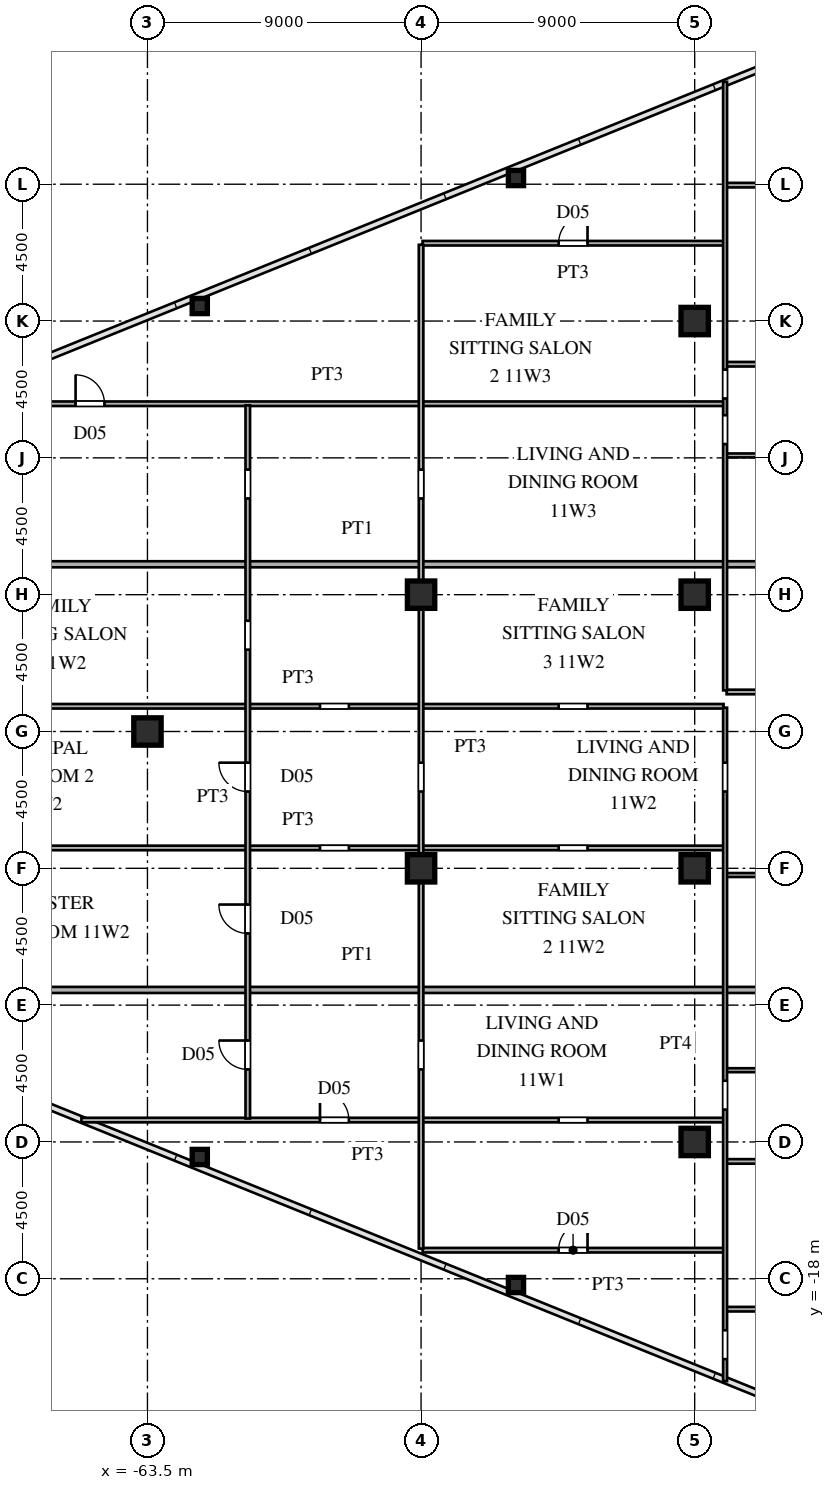
"""IFC4 building model, lengths in metres.
Left out: names, types, materials, properties, quantities, classifications, styles, units other than length and angle.
Written with IfcOpenShell. Run it as: python <this file> out.ifc"""

import sys

from ifc_helpers import new_model, si_unit, direction, frame, frame_2d, origin, origin_2d, place, context, subcontext, project, spatial, rectangle, hollow_rectangle, i_section, extrude, source, transform, mapped, element, fill, save


model = new_model("IFC4")
c1 = context("Model", 3, precision=1e-05, world=origin(), true_north=direction((0.0, 1.0)))
c2 = subcontext(c1, "Body", "Model", "MODEL_VIEW")
j1 = project(units=[si_unit("LENGTHUNIT", "METRE"), si_unit("PLANEANGLEUNIT", "RADIAN")], contexts=[c1])
p1 = place(None, origin())
s1 = spatial("IfcSite", under=j1, at=p1, CompositionType="ELEMENT")
p2 = place(p1, origin())
s2 = spatial("IfcBuilding", under=s1, at=p2, CompositionType="ELEMENT")
p3 = place(p2, frame((0.0, 0.0, 44.1)))
s3 = spatial("IfcBuildingStorey", under=s2, at=p3, CompositionType="ELEMENT", Elevation=44.1)
m1 = source(origin(), c2, "Body", "SweptSolid", [
    extrude(i_section(OverallWidth=0.9, OverallDepth=0.9, WebThickness=0.036, FlangeThickness=0.055, at=origin_2d()), origin(), (0.0, 0.0, 1.0), 3.6),
])
for number, where, z_axis, x_axis in (
    (1, (-45.5, -13.5, 0.0), (0.0, 0.0, 1.0), (1.0, 0.0, 0.0)),
    (2, (-45.5, -4.5, 0.0), (0.0, 0.0, 1.0), (1.0, 0.0, 0.0)),
    (3, (-45.5, 4.5, 0.0), (0.0, 0.0, 1.0), (1.0, 0.0, 0.0)),
    (4, (-45.5, 13.5, 0.0), (0.0, 0.0, 1.0), (1.0, 0.0, 0.0)),
    (5, (-54.5, -4.5, 0.0), (0.0, 0.0, 1.0), (1.0, 0.0, 0.0)),
    (6, (-54.5, 4.5, 0.0), (0.0, 0.0, 1.0), (1.0, 0.0, 0.0)),
    (7, (-63.5, 0.0, 0.0), (0.0, 0.0, 1.0), (1.0, 0.0, 0.0)),
):
    element("IfcColumn", number, at=place(p3, frame(where, z_axis=z_axis, x_axis=x_axis)), inside=s3, PredefinedType="COLUMN", context=c2, shape_type="MappedRepresentation", body=[
        mapped(m1, transform((0.0, 0.0, 0.0), scale=1.0)),
    ])
m2 = source(origin(), c2, "Body", "SweptSolid", [
    extrude(hollow_rectangle(XDim=0.5, YDim=0.5, WallThickness=0.02, at=origin_2d()), origin(), (0.0, 0.0, 1.0), 3.6),
])
for number, where, z_axis, x_axis in (
    (8, (-51.378, -18.204, 0.0), (0.0, 0.0, 1.0), (1.0, 0.0, 0.0)),
    (9, (-61.779, -13.994, 0.0), (0.0, 0.0, 1.0), (1.0, 0.0, 0.0)),
    (10, (-51.378, 18.204, 0.0), (0.0, 0.0, 1.0), (1.0, 0.0, 0.0)),
    (11, (-61.779, 13.994, 0.0), (0.0, 0.0, 1.0), (1.0, 0.0, 0.0)),
):
    element("IfcColumn", number, at=place(p3, frame(where, z_axis=z_axis, x_axis=x_axis)), inside=s3, PredefinedType="COLUMN", context=c2, shape_type="MappedRepresentation", body=[
        mapped(m2, transform((0.0, 0.0, 0.0), scale=1.0)),
    ])
p4 = place(p3, frame((-44.45, -19.0, 0.0), z_axis=(0.0, 0.0, 1.0), x_axis=(1.0, 0.0, 0.0)))
e12 = element("IfcWall", 12, at=p4, inside=s3, PredefinedType="PARTITIONING", context=c2, shape_type="SweptSolid", body=[
    extrude(rectangle(XDim=6.15, YDim=0.15, at=frame_2d((3.075, 0.0))), origin(), (0.0, 0.0, 1.0), 3.38),
])
p5 = place(p3, frame((-54.45, -17.06, 0.0), z_axis=(0.0, 0.0, 1.0), x_axis=(1.0, 0.0, 0.0)))
e13 = element("IfcWall", 13, at=p5, inside=s3, PredefinedType="PARTITIONING", context=c2, shape_type="SweptSolid", body=[
    extrude(rectangle(XDim=9.9, YDim=0.15, at=frame_2d((4.95, 0.0))), origin(), (0.0, 0.0, 1.0), 3.38),
])
p6 = place(p5, frame((4.475, 0.0, 0.0)))
e14 = element("IfcOpeningElement", 14, at=p6, cuts=e13, PredefinedType="OPENING", context=c2, shape_type="SweptSolid", body=[
    extrude(rectangle(XDim=0.95, YDim=2.15, at=frame_2d((0.475, 1.075))), frame((0.0, 0.085, 0.0), z_axis=(0.0, -1.0, 0.0), x_axis=(1.0, 0.0, 0.0)), (0.0, 0.0, 1.0), 0.17),
])
p7 = place(p3, frame((-44.45, -14.14, 0.0), z_axis=(0.0, 0.0, 1.0), x_axis=(1.0, 0.0, 0.0)))
e15 = element("IfcWall", 15, at=p7, inside=s3, PredefinedType="PARTITIONING", context=c2, shape_type="SweptSolid", body=[
    extrude(rectangle(XDim=6.1, YDim=0.15, at=frame_2d((3.05, 0.0))), origin(), (0.0, 0.0, 1.0), 3.38),
])
p8 = place(p7, frame((2.575, 0.0, 0.0)))
e16 = element("IfcOpeningElement", 16, at=p8, cuts=e15, PredefinedType="OPENING", context=c2, shape_type="SweptSolid", body=[
    extrude(rectangle(XDim=0.95, YDim=2.15, at=frame_2d((0.475, 1.075))), frame((0.0, 0.085, 0.0), z_axis=(0.0, -1.0, 0.0), x_axis=(1.0, 0.0, 0.0)), (0.0, 0.0, 1.0), 0.17),
])
p9 = place(p3, frame((-65.672, -12.78, 0.0), z_axis=(0.0, 0.0, 1.0), x_axis=(1.0, 0.0, 0.0)))
e17 = element("IfcWall", 17, at=p9, inside=s3, PredefinedType="PARTITIONING", context=c2, shape_type="SweptSolid", body=[
    extrude(rectangle(XDim=21.122, YDim=0.15, at=frame_2d((10.561, 0.0))), origin(), (0.0, 0.0, 1.0), 3.38),
])
p10 = place(p9, frame((15.697, 0.0, 0.0)))
e18 = element("IfcOpeningElement", 18, at=p10, cuts=e17, PredefinedType="OPENING", context=c2, shape_type="SweptSolid", body=[
    extrude(rectangle(XDim=0.95, YDim=2.15, at=frame_2d((0.475, 1.075))), frame((0.0, 0.085, 0.0), z_axis=(0.0, -1.0, 0.0), x_axis=(1.0, 0.0, 0.0)), (0.0, 0.0, 1.0), 0.17),
])
p11 = place(p9, frame((7.847, 0.0, 0.0)))
e19 = element("IfcOpeningElement", 19, at=p11, cuts=e17, PredefinedType="OPENING", context=c2, shape_type="SweptSolid", body=[
    extrude(rectangle(XDim=0.95, YDim=2.15, at=frame_2d((0.475, 1.075))), frame((0.0, 0.085, 0.0), z_axis=(0.0, -1.0, 0.0), x_axis=(1.0, 0.0, 0.0)), (0.0, 0.0, 1.0), 0.17),
])
p12 = place(p3, frame((-44.45, -11.14, 0.0), z_axis=(0.0, 0.0, 1.0), x_axis=(1.0, 0.0, 0.0)))
e20 = element("IfcWall", 20, at=p12, inside=s3, PredefinedType="PARTITIONING", context=c2, shape_type="SweptSolid", body=[
    extrude(rectangle(XDim=6.1, YDim=0.13, at=frame_2d((3.05, 0.0))), origin(), (0.0, 0.0, 1.0), 3.38),
])
p13 = place(p12, frame((2.61, 0.0, 0.0)))
e21 = element("IfcOpeningElement", 21, at=p13, cuts=e20, PredefinedType="OPENING", context=c2, shape_type="SweptSolid", body=[
    extrude(rectangle(XDim=0.88, YDim=2.1, at=frame_2d((0.44, 1.05))), frame((0.0, 0.075, 0.0), z_axis=(0.0, -1.0, 0.0), x_axis=(1.0, 0.0, 0.0)), (0.0, 0.0, 1.0), 0.15),
])
p14 = place(p3, frame((-72.505, -8.5, 0.0), z_axis=(0.0, 0.0, 1.0), x_axis=(1.0, 0.0, 0.0)))
e22 = element("IfcWall", 22, at=p14, inside=s3, PredefinedType="PARTITIONING", context=c2, shape_type="SweptSolid", body=[
    extrude(rectangle(XDim=34.125, YDim=0.2, at=frame_2d((17.062, 0.0))), origin(), (0.0, 0.0, 1.0), 3.38),
])
p15 = place(p3, frame((-44.45, -4.72, 0.0), z_axis=(0.0, 0.0, 1.0), x_axis=(1.0, 0.0, 0.0)))
e23 = element("IfcWall", 23, at=p15, inside=s3, PredefinedType="PARTITIONING", context=c2, shape_type="SweptSolid", body=[
    extrude(rectangle(XDim=6.1, YDim=0.13, at=frame_2d((3.05, 0.0))), origin(), (0.0, 0.0, 1.0), 3.38),
])
p16 = place(p15, frame((2.61, 0.0, 0.0)))
e24 = element("IfcOpeningElement", 24, at=p16, cuts=e23, PredefinedType="OPENING", context=c2, shape_type="SweptSolid", body=[
    extrude(rectangle(XDim=0.88, YDim=2.1, at=frame_2d((0.44, 1.05))), frame((0.0, 0.075, 0.0), z_axis=(0.0, -1.0, 0.0), x_axis=(1.0, 0.0, 0.0)), (0.0, 0.0, 1.0), 0.15),
])
p17 = place(p3, frame((-72.535, -3.83, 0.0), z_axis=(0.0, 0.0, 1.0), x_axis=(1.0, 0.0, 0.0)))
e25 = element("IfcWall", 25, at=p17, inside=s3, PredefinedType="PARTITIONING", context=c2, shape_type="SweptSolid", body=[
    extrude(rectangle(XDim=27.985, YDim=0.15, at=frame_2d((13.992, 0.0))), origin(), (0.0, 0.0, 1.0), 3.38),
])
p18 = place(p17, frame((22.56, 0.0, 0.0)))
e26 = element("IfcOpeningElement", 26, at=p18, cuts=e25, PredefinedType="OPENING", context=c2, shape_type="SweptSolid", body=[
    extrude(rectangle(XDim=0.95, YDim=2.15, at=frame_2d((0.475, 1.075))), frame((0.0, 0.085, 0.0), z_axis=(0.0, -1.0, 0.0), x_axis=(1.0, 0.0, 0.0)), (0.0, 0.0, 1.0), 0.17),
])
p19 = place(p17, frame((14.71, 0.0, 0.0)))
e27 = element("IfcOpeningElement", 27, at=p19, cuts=e25, PredefinedType="OPENING", context=c2, shape_type="SweptSolid", body=[
    extrude(rectangle(XDim=0.95, YDim=2.15, at=frame_2d((0.475, 1.075))), frame((0.0, 0.085, 0.0), z_axis=(0.0, -1.0, 0.0), x_axis=(1.0, 0.0, 0.0)), (0.0, 0.0, 1.0), 0.17),
])
p20 = place(p3, frame((-72.535, 0.83, 0.0), z_axis=(0.0, 0.0, 1.0), x_axis=(1.0, 0.0, 0.0)))
e28 = element("IfcWall", 28, at=p20, inside=s3, PredefinedType="PARTITIONING", context=c2, shape_type="SweptSolid", body=[
    extrude(rectangle(XDim=27.985, YDim=0.15, at=frame_2d((13.992, 0.0))), origin(), (0.0, 0.0, 1.0), 3.38),
])
p21 = place(p20, frame((22.56, 0.0, 0.0)))
e29 = element("IfcOpeningElement", 29, at=p21, cuts=e28, PredefinedType="OPENING", context=c2, shape_type="SweptSolid", body=[
    extrude(rectangle(XDim=0.95, YDim=2.15, at=frame_2d((0.475, 1.075))), frame((0.0, 0.085, 0.0), z_axis=(0.0, -1.0, 0.0), x_axis=(1.0, 0.0, 0.0)), (0.0, 0.0, 1.0), 0.17),
])
p22 = place(p20, frame((14.71, 0.0, 0.0)))
e30 = element("IfcOpeningElement", 30, at=p22, cuts=e28, PredefinedType="OPENING", context=c2, shape_type="SweptSolid", body=[
    extrude(rectangle(XDim=0.95, YDim=2.15, at=frame_2d((0.475, 1.075))), frame((0.0, 0.085, 0.0), z_axis=(0.0, -1.0, 0.0), x_axis=(1.0, 0.0, 0.0)), (0.0, 0.0, 1.0), 0.17),
])
p23 = place(p3, frame((-44.45, 1.3, 0.0), z_axis=(0.0, 0.0, 1.0), x_axis=(1.0, 0.0, 0.0)))
e31 = element("IfcWall", 31, at=p23, inside=s3, PredefinedType="PARTITIONING", context=c2, shape_type="SweptSolid", body=[
    extrude(rectangle(XDim=6.1, YDim=0.15, at=frame_2d((3.05, 0.0))), origin(), (0.0, 0.0, 1.0), 3.38),
])
p24 = place(p23, frame((2.575, 0.0, 0.0)))
e32 = element("IfcOpeningElement", 32, at=p24, cuts=e31, PredefinedType="OPENING", context=c2, shape_type="SweptSolid", body=[
    extrude(rectangle(XDim=0.95, YDim=2.15, at=frame_2d((0.475, 1.075))), frame((0.0, 0.085, 0.0), z_axis=(0.0, -1.0, 0.0), x_axis=(1.0, 0.0, 0.0)), (0.0, 0.0, 1.0), 0.17),
])
p25 = place(p3, frame((-72.505, 5.5, 0.0), z_axis=(0.0, 0.0, 1.0), x_axis=(1.0, 0.0, 0.0)))
e33 = element("IfcWall", 33, at=p25, inside=s3, PredefinedType="PARTITIONING", context=c2, shape_type="SweptSolid", body=[
    extrude(rectangle(XDim=34.125, YDim=0.2, at=frame_2d((17.062, 0.0))), origin(), (0.0, 0.0, 1.0), 3.38),
])
p26 = place(p3, frame((-44.45, 9.08, 0.0), z_axis=(0.0, 0.0, 1.0), x_axis=(1.0, 0.0, 0.0)))
e34 = element("IfcWall", 34, at=p26, inside=s3, PredefinedType="PARTITIONING", context=c2, shape_type="SweptSolid", body=[
    extrude(rectangle(XDim=6.1, YDim=0.13, at=frame_2d((3.05, 0.0))), origin(), (0.0, 0.0, 1.0), 3.38),
])
p27 = place(p26, frame((2.61, 0.0, 0.0)))
e35 = element("IfcOpeningElement", 35, at=p27, cuts=e34, PredefinedType="OPENING", context=c2, shape_type="SweptSolid", body=[
    extrude(rectangle(XDim=0.88, YDim=2.1, at=frame_2d((0.44, 1.05))), frame((0.0, 0.075, 0.0), z_axis=(0.0, -1.0, 0.0), x_axis=(1.0, 0.0, 0.0)), (0.0, 0.0, 1.0), 0.15),
])
p28 = place(p3, frame((-70.613, 10.78, 0.0), z_axis=(0.0, 0.0, 1.0), x_axis=(1.0, 0.0, 0.0)))
e36 = element("IfcWall", 36, at=p28, inside=s3, PredefinedType="PARTITIONING", context=c2, shape_type="SweptSolid", body=[
    extrude(rectangle(XDim=26.063, YDim=0.15, at=frame_2d((13.031, 0.0))), origin(), (0.0, 0.0, 1.0), 3.38),
])
p29 = place(p28, frame((4.749, 0.0, 0.0)))
e37 = element("IfcOpeningElement", 37, at=p29, cuts=e36, PredefinedType="OPENING", context=c2, shape_type="SweptSolid", body=[
    extrude(rectangle(XDim=0.95, YDim=2.15, at=frame_2d((0.475, 1.075))), frame((0.0, 0.085, 0.0), z_axis=(0.0, -1.0, 0.0), x_axis=(1.0, 0.0, 0.0)), (0.0, 0.0, 1.0), 0.17),
])
p30 = place(p3, frame((-44.45, 12.08, 0.0), z_axis=(0.0, 0.0, 1.0), x_axis=(1.0, 0.0, 0.0)))
e38 = element("IfcWall", 38, at=p30, inside=s3, PredefinedType="PARTITIONING", context=c2, shape_type="SweptSolid", body=[
    extrude(rectangle(XDim=6.1, YDim=0.15, at=frame_2d((3.05, 0.0))), origin(), (0.0, 0.0, 1.0), 3.38),
])
p31 = place(p30, frame((2.575, 0.0, 0.0)))
e39 = element("IfcOpeningElement", 39, at=p31, cuts=e38, PredefinedType="OPENING", context=c2, shape_type="SweptSolid", body=[
    extrude(rectangle(XDim=0.95, YDim=2.15, at=frame_2d((0.475, 1.075))), frame((0.0, 0.085, 0.0), z_axis=(0.0, -1.0, 0.0), x_axis=(1.0, 0.0, 0.0)), (0.0, 0.0, 1.0), 0.17),
])
p32 = place(p3, frame((-54.45, 16.06, 0.0), z_axis=(0.0, 0.0, 1.0), x_axis=(1.0, 0.0, 0.0)))
e40 = element("IfcWall", 40, at=p32, inside=s3, PredefinedType="PARTITIONING", context=c2, shape_type="SweptSolid", body=[
    extrude(rectangle(XDim=9.9, YDim=0.15, at=frame_2d((4.95, 0.0))), origin(), (0.0, 0.0, 1.0), 3.38),
])
p33 = place(p32, frame((4.475, 0.0, 0.0)))
e41 = element("IfcOpeningElement", 41, at=p33, cuts=e40, PredefinedType="OPENING", context=c2, shape_type="SweptSolid", body=[
    extrude(rectangle(XDim=0.95, YDim=2.15, at=frame_2d((0.475, 1.075))), frame((0.0, 0.085, 0.0), z_axis=(0.0, -1.0, 0.0), x_axis=(1.0, 0.0, 0.0)), (0.0, 0.0, 1.0), 0.17),
])
p34 = place(p3, frame((-44.45, 17.97, 0.0), z_axis=(0.0, 0.0, 1.0), x_axis=(1.0, 0.0, 0.0)))
e42 = element("IfcWall", 42, at=p34, inside=s3, PredefinedType="PARTITIONING", context=c2, shape_type="SweptSolid", body=[
    extrude(rectangle(XDim=6.15, YDim=0.15, at=frame_2d((3.075, 0.0))), origin(), (0.0, 0.0, 1.0), 3.38),
])
p35 = place(p3, frame((-60.2, -12.728, 0.0), z_axis=(0.0, 0.0, 1.0), x_axis=(0.0, 1.0, 0.0)))
e43 = element("IfcWall", 43, at=p35, inside=s3, PredefinedType="PARTITIONING", context=c2, shape_type="SweptSolid", body=[
    extrude(rectangle(XDim=23.456, YDim=0.15, at=frame_2d((11.728, 0.0))), origin(), (0.0, 0.0, 1.0), 3.38),
])
p36 = place(p35, frame((1.614, 0.0, 0.0)))
e44 = element("IfcOpeningElement", 44, at=p36, cuts=e43, PredefinedType="OPENING", context=c2, shape_type="SweptSolid", body=[
    extrude(rectangle(XDim=0.95, YDim=2.15, at=frame_2d((0.475, 1.075))), frame((0.0, 0.085, 0.0), z_axis=(0.0, -1.0, 0.0), x_axis=(1.0, 0.0, 0.0)), (0.0, 0.0, 1.0), 0.17),
])
p37 = place(p35, frame((6.086, 0.0, 0.0)))
e45 = element("IfcOpeningElement", 45, at=p37, cuts=e43, PredefinedType="OPENING", context=c2, shape_type="SweptSolid", body=[
    extrude(rectangle(XDim=0.95, YDim=2.15, at=frame_2d((0.475, 1.075))), frame((0.0, 0.085, 0.0), z_axis=(0.0, -1.0, 0.0), x_axis=(1.0, 0.0, 0.0)), (0.0, 0.0, 1.0), 0.17),
])
p38 = place(p35, frame((10.753, 0.0, 0.0)))
e46 = element("IfcOpeningElement", 46, at=p38, cuts=e43, PredefinedType="OPENING", context=c2, shape_type="SweptSolid", body=[
    extrude(rectangle(XDim=0.95, YDim=2.15, at=frame_2d((0.475, 1.075))), frame((0.0, 0.085, 0.0), z_axis=(0.0, -1.0, 0.0), x_axis=(1.0, 0.0, 0.0)), (0.0, 0.0, 1.0), 0.17),
])
p39 = place(p35, frame((15.42, 0.0, 0.0)))
e47 = element("IfcOpeningElement", 47, at=p39, cuts=e43, PredefinedType="OPENING", context=c2, shape_type="SweptSolid", body=[
    extrude(rectangle(XDim=0.95, YDim=2.15, at=frame_2d((0.475, 1.075))), frame((0.0, 0.085, 0.0), z_axis=(0.0, -1.0, 0.0), x_axis=(1.0, 0.0, 0.0)), (0.0, 0.0, 1.0), 0.17),
])
p40 = place(p35, frame((20.392, 0.0, 0.0)))
e48 = element("IfcOpeningElement", 48, at=p40, cuts=e43, PredefinedType="OPENING", context=c2, shape_type="SweptSolid", body=[
    extrude(rectangle(XDim=0.95, YDim=2.15, at=frame_2d((0.475, 1.075))), frame((0.0, 0.085, 0.0), z_axis=(0.0, -1.0, 0.0), x_axis=(1.0, 0.0, 0.0)), (0.0, 0.0, 1.0), 0.17),
])
p41 = place(p3, frame((-54.5, -17.006, 0.0), z_axis=(0.0, 0.0, 1.0), x_axis=(0.0, 1.0, 0.0)))
e49 = element("IfcWall", 49, at=p41, inside=s3, PredefinedType="PARTITIONING", context=c2, shape_type="SweptSolid", body=[
    extrude(rectangle(XDim=33.012, YDim=0.15, at=frame_2d((16.506, 0.0))), origin(), (0.0, 0.0, 1.0), 2.68),
])
p42 = place(p41, frame((5.892, 0.0, 0.0)))
e50 = element("IfcOpeningElement", 50, at=p42, cuts=e49, PredefinedType="OPENING", context=c2, shape_type="SweptSolid", body=[
    extrude(rectangle(XDim=0.95, YDim=2.15, at=frame_2d((0.475, 1.075))), frame((0.0, 0.085, 0.0), z_axis=(0.0, -1.0, 0.0), x_axis=(1.0, 0.0, 0.0)), (0.0, 0.0, 1.0), 0.17),
])
p43 = place(p41, frame((15.031, 0.0, 0.0)))
e51 = element("IfcOpeningElement", 51, at=p43, cuts=e49, PredefinedType="OPENING", context=c2, shape_type="SweptSolid", body=[
    extrude(rectangle(XDim=0.95, YDim=2.15, at=frame_2d((0.475, 1.075))), frame((0.0, 0.085, 0.0), z_axis=(0.0, -1.0, 0.0), x_axis=(1.0, 0.0, 0.0)), (0.0, 0.0, 1.0), 0.17),
])
p44 = place(p41, frame((24.67, 0.0, 0.0)))
e52 = element("IfcOpeningElement", 52, at=p44, cuts=e49, PredefinedType="OPENING", context=c2, shape_type="SweptSolid", body=[
    extrude(rectangle(XDim=0.95, YDim=2.15, at=frame_2d((0.475, 1.075))), frame((0.0, 0.085, 0.0), z_axis=(0.0, -1.0, 0.0), x_axis=(1.0, 0.0, 0.0)), (0.0, 0.0, 1.0), 0.17),
])
p45 = place(p3, frame((-44.5, -21.368, 0.0), z_axis=(0.0, 0.0, 1.0), x_axis=(0.0, 1.0, 0.0)))
e53 = element("IfcWall", 53, at=p45, inside=s3, PredefinedType="PARTITIONING", context=c2, shape_type="SweptSolid", body=[
    extrude(rectangle(XDim=22.151, YDim=0.13, at=frame_2d((11.075, 0.0))), origin(), (0.0, 0.0, 1.0), 3.38),
])
p46 = place(p45, frame((8.932, 0.0, 0.0)))
e54 = element("IfcOpeningElement", 54, at=p46, cuts=e53, PredefinedType="OPENING", context=c2, shape_type="SweptSolid", body=[
    extrude(rectangle(XDim=0.95, YDim=2.15, at=frame_2d((0.475, 1.075))), frame((0.0, 0.075, 0.0), z_axis=(0.0, -1.0, 0.0), x_axis=(1.0, 0.0, 0.0)), (0.0, 0.0, 1.0), 0.15),
])
p47 = place(p45, frame((0.724, 0.0, 0.0)))
e55 = element("IfcOpeningElement", 55, at=p47, cuts=e53, PredefinedType="OPENING", context=c2, shape_type="SweptSolid", body=[
    extrude(rectangle(XDim=0.95, YDim=2.15, at=frame_2d((0.475, 1.075))), frame((0.0, 0.075, 0.0), z_axis=(0.0, -1.0, 0.0), x_axis=(1.0, 0.0, 0.0)), (0.0, 0.0, 1.0), 0.15),
])
p48 = place(p45, frame((19.393, 0.0, 0.0)))
e56 = element("IfcOpeningElement", 56, at=p48, cuts=e53, PredefinedType="OPENING", context=c2, shape_type="SweptSolid", body=[
    extrude(rectangle(XDim=0.95, YDim=2.15, at=frame_2d((0.475, 1.075))), frame((0.0, 0.075, 0.0), z_axis=(0.0, -1.0, 0.0), x_axis=(1.0, 0.0, 0.0)), (0.0, 0.0, 1.0), 0.15),
])
p49 = place(p3, frame((-44.5, 1.352, 0.0), z_axis=(0.0, 0.0, 1.0), x_axis=(0.0, 1.0, 0.0)))
e57 = element("IfcWall", 57, at=p49, inside=s3, PredefinedType="PARTITIONING", context=c2, shape_type="SweptSolid", body=[
    extrude(rectangle(XDim=20.016, YDim=0.13, at=frame_2d((10.008, 0.0))), origin(), (0.0, 0.0, 1.0), 3.38),
])
p50 = place(p49, frame((8.101, 0.0, 0.0)))
e58 = element("IfcOpeningElement", 58, at=p50, cuts=e57, PredefinedType="OPENING", context=c2, shape_type="SweptSolid", body=[
    extrude(rectangle(XDim=0.95, YDim=2.15, at=frame_2d((0.475, 1.075))), frame((0.0, 0.075, 0.0), z_axis=(0.0, -1.0, 0.0), x_axis=(1.0, 0.0, 0.0)), (0.0, 0.0, 1.0), 0.15),
])
p51 = place(p49, frame((9.601, 0.0, 0.0)))
e59 = element("IfcOpeningElement", 59, at=p51, cuts=e57, PredefinedType="OPENING", context=c2, shape_type="SweptSolid", body=[
    extrude(rectangle(XDim=0.95, YDim=2.15, at=frame_2d((0.475, 1.075))), frame((0.0, 0.075, 0.0), z_axis=(0.0, -1.0, 0.0), x_axis=(1.0, 0.0, 0.0)), (0.0, 0.0, 1.0), 0.15),
])
m3 = source(origin(), c2, "Body", "SweptSolid", [
    extrude(rectangle(XDim=0.95, YDim=2.15, at=frame_2d((0.475, 1.075))), frame((0.0, 0.025, 0.0), z_axis=(0.0, -1.0, 0.0), x_axis=(1.0, 0.0, 0.0)), (0.0, 0.0, 1.0), 0.05),
])
p52 = place(p6, origin())
e60 = element("IfcDoor", 60, at=p52, inside=s3, OperationType="SINGLE_SWING_RIGHT", PredefinedType="DOOR", context=c2, shape_type="MappedRepresentation", body=[
    mapped(m3, transform((0.0, 0.0, 0.0), scale=1.0)),
])
fill(e14, e60)
p53 = place(p11, origin())
e61 = element("IfcDoor", 61, at=p53, inside=s3, OperationType="SINGLE_SWING_LEFT", PredefinedType="DOOR", context=c2, shape_type="MappedRepresentation", body=[
    mapped(m3, transform((0.0, 0.0, 0.0), scale=1.0)),
])
fill(e19, e61)
p54 = place(p29, origin())
e62 = element("IfcDoor", 62, at=p54, inside=s3, OperationType="SINGLE_SWING_LEFT", PredefinedType="DOOR", context=c2, shape_type="MappedRepresentation", body=[
    mapped(m3, transform((0.0, 0.0, 0.0), scale=1.0)),
])
fill(e37, e62)
p55 = place(p33, origin())
e63 = element("IfcDoor", 63, at=p55, inside=s3, OperationType="SINGLE_SWING_RIGHT", PredefinedType="DOOR", context=c2, shape_type="MappedRepresentation", body=[
    mapped(m3, transform((0.0, 0.0, 0.0), scale=1.0)),
])
fill(e41, e63)
p56 = place(p36, origin())
e64 = element("IfcDoor", 64, at=p56, inside=s3, OperationType="SINGLE_SWING_RIGHT", PredefinedType="DOOR", context=c2, shape_type="MappedRepresentation", body=[
    mapped(m3, transform((0.0, 0.0, 0.0), scale=1.0)),
])
fill(e44, e64)
p57 = place(p37, origin())
e65 = element("IfcDoor", 65, at=p57, inside=s3, OperationType="SINGLE_SWING_RIGHT", PredefinedType="DOOR", context=c2, shape_type="MappedRepresentation", body=[
    mapped(m3, transform((0.0, 0.0, 0.0), scale=1.0)),
])
fill(e45, e65)
p58 = place(p38, origin())
e66 = element("IfcDoor", 66, at=p58, inside=s3, OperationType="SINGLE_SWING_RIGHT", PredefinedType="DOOR", context=c2, shape_type="MappedRepresentation", body=[
    mapped(m3, transform((0.0, 0.0, 0.0), scale=1.0)),
])
fill(e46, e66)
save(model, sys.argv[1])
